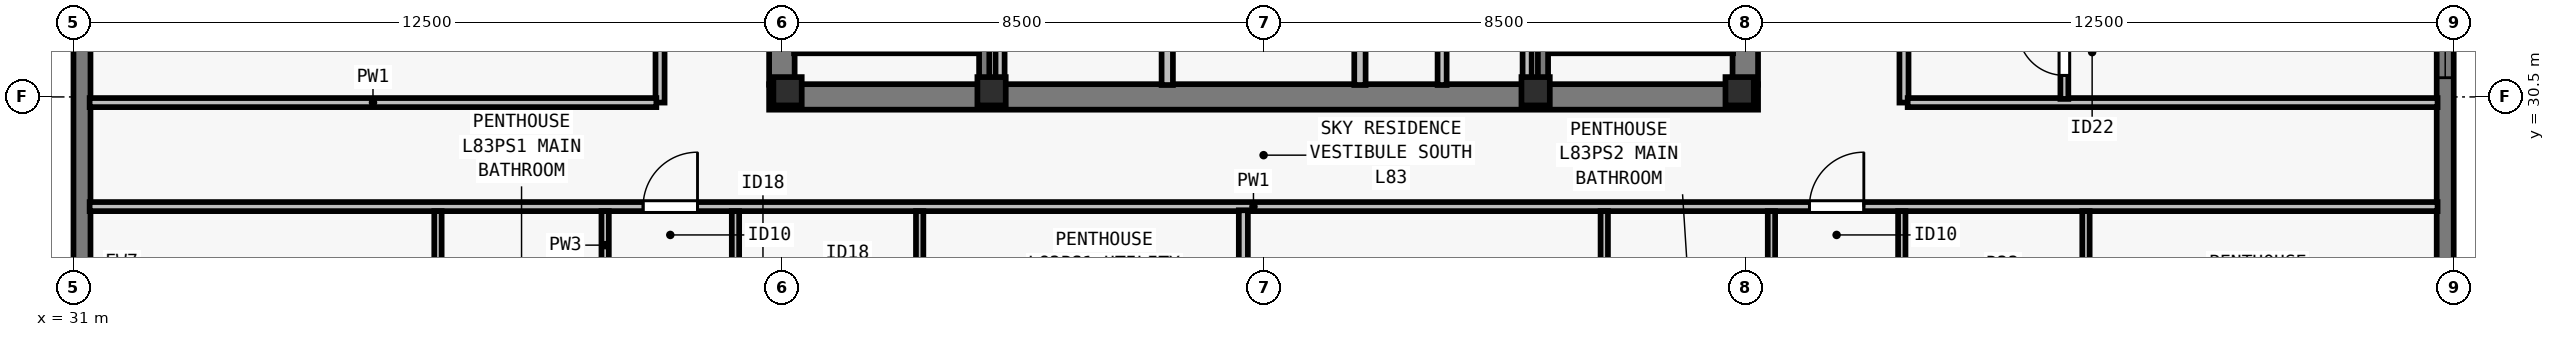
"""IFC4 building model, lengths in metres.
Left out: names, types, materials, properties, quantities, classifications, styles, units other than length and angle.
Written with IfcOpenShell. Run it as: python <this file> out.ifc"""

import sys

from ifc_helpers import new_model, si_unit, direction, frame, frame_2d, origin, origin_2d, place, context, subcontext, project, spatial, rectangle, i_section, extrude, element, fill, save


model = new_model("IFC4")
c1 = context("Model", 3, precision=1e-05, world=origin(), true_north=direction((0.0, 1.0)))
c2 = subcontext(c1, "Body", "Model", "MODEL_VIEW")
j1 = project(units=[si_unit("LENGTHUNIT", "METRE"), si_unit("PLANEANGLEUNIT", "RADIAN")], contexts=[c1])
p1 = place(None, origin())
s1 = spatial("IfcSite", under=j1, at=p1, CompositionType="ELEMENT")
p2 = place(p1, origin())
s2 = spatial("IfcBuilding", under=s1, at=p2, CompositionType="ELEMENT")
p3 = place(p2, frame((0.0, 0.0, 301.5)))
s3 = spatial("IfcBuildingStorey", under=s2, at=p3, CompositionType="ELEMENT", Elevation=301.5)
for number, where, z_axis, x_axis in (
    (1, (43.6, 30.6, 0.0), (0.0, 0.0, 1.0), (1.0, 0.0, 0.0)),
    (2, (47.2, 30.6, 0.0), (0.0, 0.0, 1.0), (1.0, 0.0, 0.0)),
    (3, (56.8, 30.6, 0.0), (0.0, 0.0, 1.0), (1.0, 0.0, 0.0)),
    (4, (60.4, 30.6, 0.0), (0.0, 0.0, 1.0), (1.0, 0.0, 0.0)),
):
    element("IfcColumn", number, at=place(p3, frame(where, z_axis=z_axis, x_axis=x_axis)), inside=s3, PredefinedType="COLUMN", context=c2, shape_type="SweptSolid", body=[
        extrude(i_section(OverallWidth=0.5, OverallDepth=0.5, WebThickness=0.028, FlangeThickness=0.045, at=origin_2d()), origin(), (0.0, 0.0, 1.0), 3.5),
    ])
p4 = place(p3, frame((72.85, 34.8, 0.0), z_axis=(0.0, 0.0, 1.0), x_axis=(0.0, -1.0, 0.0)))
e5 = element("IfcWall", 5, at=p4, inside=s3, PredefinedType="SOLIDWALL", context=c2, shape_type="SweptSolid", body=[
    extrude(rectangle(XDim=11.022, YDim=0.3, at=frame_2d((5.511, 0.0))), origin(), (0.0, 0.0, 1.0), 3.29),
])
p5 = place(p4, frame((1.961, 0.0, 0.8)))
e6 = element("IfcOpeningElement", 6, at=p5, cuts=e5, PredefinedType="OPENING", context=c2, shape_type="SweptSolid", body=[
    extrude(rectangle(XDim=2.0, YDim=1.758, at=frame_2d((1.0, 0.879))), frame((0.0, 0.16, 0.0), z_axis=(0.0, -1.0, 0.0), x_axis=(1.0, 0.0, 0.0)), (0.0, 0.0, 1.0), 0.32),
])
p6 = place(p3, frame((31.15, 23.5, 0.0), z_axis=(0.0, 0.0, 1.0), x_axis=(0.0, 1.0, 0.0)))
e7 = element("IfcWall", 7, at=p6, inside=s3, PredefinedType="SOLIDWALL", context=c2, shape_type="SweptSolid", body=[
    extrude(rectangle(XDim=30.722, YDim=0.3, at=frame_2d((15.361, 0.0))), origin(), (0.0, 0.0, 1.0), 3.29),
])
p7 = place(p6, frame((8.331, 0.0, 0.8)))
e8 = element("IfcOpeningElement", 8, at=p7, cuts=e7, PredefinedType="OPENING", context=c2, shape_type="SweptSolid", body=[
    extrude(rectangle(XDim=1.65, YDim=1.758, at=frame_2d((0.825, 0.879))), frame((0.0, 0.16, 0.0), z_axis=(0.0, -1.0, 0.0), x_axis=(1.0, 0.0, 0.0)), (0.0, 0.0, 1.0), 0.32),
])
p8 = place(p6, frame((12.442, 0.0, 0.8)))
e9 = element("IfcOpeningElement", 9, at=p8, cuts=e7, PredefinedType="OPENING", context=c2, shape_type="SweptSolid", body=[
    extrude(rectangle(XDim=2.0, YDim=1.758, at=frame_2d((1.0, 0.879))), frame((0.0, 0.16, 0.0), z_axis=(0.0, -1.0, 0.0), x_axis=(1.0, 0.0, 0.0)), (0.0, 0.0, 1.0), 0.32),
])
p9 = place(p6, frame((16.455, 0.0, 0.8)))
e10 = element("IfcOpeningElement", 10, at=p9, cuts=e7, PredefinedType="OPENING", context=c2, shape_type="SweptSolid", body=[
    extrude(rectangle(XDim=1.65, YDim=1.758, at=frame_2d((0.825, 0.879))), frame((0.0, 0.16, 0.0), z_axis=(0.0, -1.0, 0.0), x_axis=(1.0, 0.0, 0.0)), (0.0, 0.0, 1.0), 0.32),
])
p10 = place(p6, frame((20.967, 0.0, 0.8)))
e11 = element("IfcOpeningElement", 11, at=p10, cuts=e7, PredefinedType="OPENING", context=c2, shape_type="SweptSolid", body=[
    extrude(rectangle(XDim=2.0, YDim=1.758, at=frame_2d((1.0, 0.879))), frame((0.0, 0.16, 0.0), z_axis=(0.0, -1.0, 0.0), x_axis=(1.0, 0.0, 0.0)), (0.0, 0.0, 1.0), 0.32),
])
p11 = place(p3, frame((43.275, 30.5, 0.0), z_axis=(0.0, 0.0, 1.0), x_axis=(1.0, 0.0, 0.0)))
e12 = element("IfcWall", 12, at=p11, inside=s3, PredefinedType="SHEAR", context=c2, shape_type="SweptSolid", body=[
    extrude(rectangle(XDim=17.45, YDim=0.45, at=frame_2d((8.725, 0.0))), origin(), (0.0, 0.0, 1.0), 3.29),
])
for number, where, z_axis, x_axis in (
    (13, (43.5, 30.715, 0.0), (0.0, 0.0, 1.0), (0.0, 1.0, 0.0)),
    (14, (60.5, 30.715, 0.0), (0.0, 0.0, 1.0), (0.0, 1.0, 0.0)),
):
    element("IfcWall", number, at=place(p3, frame(where, z_axis=z_axis, x_axis=x_axis)), inside=s3, PredefinedType="SHEAR", context=c2, shape_type="SweptSolid", body=[
        extrude(rectangle(XDim=8.035, YDim=0.45, at=frame_2d((4.018, 0.0))), origin(), (0.0, 0.0, 1.0), 3.29),
    ])
p12 = place(p3, frame((50.3, 30.71, 0.0), z_axis=(0.0, 0.0, 1.0), x_axis=(0.0, 1.0, 0.0)))
e15 = element("IfcWall", 15, at=p12, inside=s3, PredefinedType="SOLIDWALL", context=c2, shape_type="SweptSolid", body=[
    extrude(rectangle(XDim=7.905, YDim=0.2, at=frame_2d((3.953, 0.0))), origin(), (0.0, 0.0, 1.0), 3.29),
])
p13 = place(p12, frame((1.39, 0.0, 0.0)))
e16 = element("IfcOpeningElement", 16, at=p13, cuts=e15, PredefinedType="OPENING", context=c2, shape_type="SweptSolid", body=[
    extrude(rectangle(XDim=0.9, YDim=2.12, at=frame_2d((0.45, 1.06))), frame((0.0, 0.11, 0.0), z_axis=(0.0, -1.0, 0.0), x_axis=(1.0, 0.0, 0.0)), (0.0, 0.0, 1.0), 0.22),
])
p14 = place(p12, frame((5.39, 0.0, 0.0)))
e17 = element("IfcOpeningElement", 17, at=p14, cuts=e15, PredefinedType="OPENING", context=c2, shape_type="SweptSolid", body=[
    extrude(rectangle(XDim=0.9, YDim=2.12, at=frame_2d((0.45, 1.06))), frame((0.0, 0.11, 0.0), z_axis=(0.0, -1.0, 0.0), x_axis=(1.0, 0.0, 0.0)), (0.0, 0.0, 1.0), 0.22),
])
p15 = place(p3, frame((53.7, 30.71, 0.0), z_axis=(0.0, 0.0, 1.0), x_axis=(0.0, 1.0, 0.0)))
e18 = element("IfcWall", 18, at=p15, inside=s3, PredefinedType="SOLIDWALL", context=c2, shape_type="SweptSolid", body=[
    extrude(rectangle(XDim=7.905, YDim=0.2, at=frame_2d((3.953, 0.0))), origin(), (0.0, 0.0, 1.0), 3.29),
])
p16 = place(p15, frame((2.14, 0.0, 0.0)))
e19 = element("IfcOpeningElement", 19, at=p16, cuts=e18, PredefinedType="OPENING", context=c2, shape_type="SweptSolid", body=[
    extrude(rectangle(XDim=0.95, YDim=2.12, at=frame_2d((0.475, 1.06))), frame((0.0, 0.11, 0.0), z_axis=(0.0, -1.0, 0.0), x_axis=(1.0, 0.0, 0.0)), (0.0, 0.0, 1.0), 0.22),
])
for number, where, z_axis, x_axis in (
    (20, (47.35, 30.71, 0.0), (0.0, 0.0, 1.0), (0.0, 1.0, 0.0)),
    (21, (56.65, 30.71, 0.0), (0.0, 0.0, 1.0), (0.0, 1.0, 0.0)),
):
    element("IfcWall", number, at=place(p3, frame(where, z_axis=z_axis, x_axis=x_axis)), inside=s3, PredefinedType="PARTITIONING", context=c2, shape_type="SweptSolid", body=[
        extrude(rectangle(XDim=7.905, YDim=0.16, at=frame_2d((3.953, 0.0))), origin(), (0.0, 0.0, 1.0), 3.29),
    ])
p17 = place(p3, frame((55.15, 30.71, 0.0), z_axis=(0.0, 0.0, 1.0), x_axis=(0.0, 1.0, 0.0)))
e22 = element("IfcWall", 22, at=p17, inside=s3, PredefinedType="PARTITIONING", context=c2, shape_type="SweptSolid", body=[
    extrude(rectangle(XDim=7.905, YDim=0.16, at=frame_2d((3.953, 0.0))), origin(), (0.0, 0.0, 1.0), 3.29),
])
p18 = place(p17, frame((3.54, 0.0, 0.0)))
e23 = element("IfcOpeningElement", 23, at=p18, cuts=e22, PredefinedType="OPENING", context=c2, shape_type="SweptSolid", body=[
    extrude(rectangle(XDim=0.85, YDim=2.12, at=frame_2d((0.425, 1.06))), frame((0.0, 0.09, 0.0), z_axis=(0.0, -1.0, 0.0), x_axis=(1.0, 0.0, 0.0)), (0.0, 0.0, 1.0), 0.18),
])
p19 = place(p3, frame((31.285, 28.565, 0.0), z_axis=(0.0, 0.0, 1.0), x_axis=(1.0, 0.0, 0.0)))
e24 = element("IfcWall", 24, at=p19, inside=s3, PredefinedType="PARTITIONING", context=c2, shape_type="SweptSolid", body=[
    extrude(rectangle(XDim=41.43, YDim=0.16, at=frame_2d((20.715, 0.0))), origin(), (0.0, 0.0, 1.0), 3.009),
])
p20 = place(p19, frame((9.766, 0.0, 0.0)))
e25 = element("IfcOpeningElement", 25, at=p20, cuts=e24, PredefinedType="OPENING", context=c2, shape_type="SweptSolid", body=[
    extrude(rectangle(XDim=0.96, YDim=2.18, at=frame_2d((0.48, 1.09))), frame((0.0, 0.09, 0.0), z_axis=(0.0, -1.0, 0.0), x_axis=(1.0, 0.0, 0.0)), (0.0, 0.0, 1.0), 0.18),
])
p21 = place(p19, frame((30.346, 0.0, 0.0)))
e26 = element("IfcOpeningElement", 26, at=p21, cuts=e24, PredefinedType="OPENING", context=c2, shape_type="SweptSolid", body=[
    extrude(rectangle(XDim=0.96, YDim=2.18, at=frame_2d((0.48, 1.09))), frame((0.0, 0.09, 0.0), z_axis=(0.0, -1.0, 0.0), x_axis=(1.0, 0.0, 0.0)), (0.0, 0.0, 1.0), 0.18),
])
p22 = place(p3, frame((41.35, 30.4, 0.0), z_axis=(0.0, 0.0, 1.0), x_axis=(0.0, 1.0, 0.0)))
e27 = element("IfcWall", 27, at=p22, inside=s3, PredefinedType="PARTITIONING", context=c2, shape_type="SweptSolid", body=[
    extrude(rectangle(XDim=17.2, YDim=0.16, at=frame_2d((8.6, 0.0))), origin(), (0.0, 0.0, 1.0), 3.009),
])
p23 = place(p22, frame((8.0, 0.0, 0.0)))
e28 = element("IfcOpeningElement", 28, at=p23, cuts=e27, PredefinedType="OPENING", context=c2, shape_type="SweptSolid", body=[
    extrude(rectangle(XDim=0.96, YDim=2.12, at=frame_2d((0.48, 1.06))), frame((0.0, 0.09, 0.0), z_axis=(0.0, -1.0, 0.0), x_axis=(1.0, 0.0, 0.0)), (0.0, 0.0, 1.0), 0.18),
])
p24 = place(p3, frame((63.3, 30.4, 0.0), z_axis=(0.0, 0.0, 1.0), x_axis=(0.0, 1.0, 0.0)))
e29 = element("IfcWall", 29, at=p24, inside=s3, PredefinedType="PARTITIONING", context=c2, shape_type="SweptSolid", body=[
    extrude(rectangle(XDim=17.2, YDim=0.16, at=frame_2d((8.6, 0.0))), origin(), (0.0, 0.0, 1.0), 3.29),
])
p25 = place(p24, frame((8.12, 0.0, 0.0)))
e30 = element("IfcOpeningElement", 30, at=p25, cuts=e29, PredefinedType="OPENING", context=c2, shape_type="SweptSolid", body=[
    extrude(rectangle(XDim=0.96, YDim=2.18, at=frame_2d((0.48, 1.09))), frame((0.0, 0.09, 0.0), z_axis=(0.0, -1.0, 0.0), x_axis=(1.0, 0.0, 0.0)), (0.0, 0.0, 1.0), 0.18),
])
p26 = place(p3, frame((31.285, 30.4, 0.0), z_axis=(0.0, 0.0, 1.0), x_axis=(1.0, 0.0, 0.0)))
e31 = element("IfcWall", 31, at=p26, inside=s3, PredefinedType="PARTITIONING", context=c2, shape_type="SweptSolid", body=[
    extrude(rectangle(XDim=10.0, YDim=0.16, at=frame_2d((5.0, 0.0))), origin(), (0.0, 0.0, 1.0), 3.29),
])
p27 = place(p3, frame((63.365, 30.4, 0.0), z_axis=(0.0, 0.0, 1.0), x_axis=(1.0, 0.0, 0.0)))
e32 = element("IfcWall", 32, at=p27, inside=s3, PredefinedType="PARTITIONING", context=c2, shape_type="SweptSolid", body=[
    extrude(rectangle(XDim=9.35, YDim=0.16, at=frame_2d((4.675, 0.0))), origin(), (0.0, 0.0, 1.0), 3.29),
])
p28 = place(p3, frame((37.431, 25.735, 0.0), z_axis=(0.0, 0.0, 1.0), x_axis=(0.0, 1.0, 0.0)))
e33 = element("IfcWall", 33, at=p28, inside=s3, PredefinedType="PLUMBINGWALL", context=c2, shape_type="SweptSolid", body=[
    extrude(rectangle(XDim=2.75, YDim=0.13, at=frame_2d((1.375, 0.0))), origin(), (0.0, 0.0, 1.0), 3.29),
])
p29 = place(p3, frame((40.381, 25.735, 0.0), z_axis=(0.0, 0.0, 1.0), x_axis=(0.0, 1.0, 0.0)))
e34 = element("IfcWall", 34, at=p29, inside=s3, PredefinedType="PLUMBINGWALL", context=c2, shape_type="SweptSolid", body=[
    extrude(rectangle(XDim=2.75, YDim=0.13, at=frame_2d((1.375, 0.0))), origin(), (0.0, 0.0, 1.0), 3.29),
])
p30 = place(p29, frame((0.55, 0.0, 0.0)))
e35 = element("IfcOpeningElement", 35, at=p30, cuts=e34, PredefinedType="OPENING", context=c2, shape_type="SweptSolid", body=[
    extrude(rectangle(XDim=0.85, YDim=2.08, at=frame_2d((0.425, 1.04))), frame((0.0, 0.075, 0.0), z_axis=(0.0, -1.0, 0.0), x_axis=(1.0, 0.0, 0.0)), (0.0, 0.0, 1.0), 0.15),
])
p31 = place(p3, frame((45.931, 25.735, 0.0), z_axis=(0.0, 0.0, 1.0), x_axis=(0.0, 1.0, 0.0)))
e36 = element("IfcWall", 36, at=p31, inside=s3, PredefinedType="PLUMBINGWALL", context=c2, shape_type="SweptSolid", body=[
    extrude(rectangle(XDim=2.75, YDim=0.13, at=frame_2d((1.375, 0.0))), origin(), (0.0, 0.0, 1.0), 3.29),
])
p32 = place(p3, frame((42.681, 25.735, 0.0), z_axis=(0.0, 0.0, 1.0), x_axis=(0.0, 1.0, 0.0)))
e37 = element("IfcWall", 37, at=p32, inside=s3, PredefinedType="PLUMBINGWALL", context=c2, shape_type="SweptSolid", body=[
    extrude(rectangle(XDim=2.75, YDim=0.13, at=frame_2d((1.375, 0.0))), origin(), (0.0, 0.0, 1.0), 3.29),
])
p33 = place(p32, frame((0.55, 0.0, 0.0)))
e38 = element("IfcOpeningElement", 38, at=p33, cuts=e37, PredefinedType="OPENING", context=c2, shape_type="SweptSolid", body=[
    extrude(rectangle(XDim=0.88, YDim=2.1, at=frame_2d((0.44, 1.05))), frame((0.0, 0.075, 0.0), z_axis=(0.0, -1.0, 0.0), x_axis=(1.0, 0.0, 0.0)), (0.0, 0.0, 1.0), 0.15),
])
p34 = place(p3, frame((51.643, 18.285, 0.0), z_axis=(0.0, 0.0, 1.0), x_axis=(0.0, 1.0, 0.0)))
e39 = element("IfcWall", 39, at=p34, inside=s3, PredefinedType="PARTITIONING", context=c2, shape_type="SweptSolid", body=[
    extrude(rectangle(XDim=10.215, YDim=0.16, at=frame_2d((5.107, 0.0))), origin(), (0.0, 0.0, 1.0), 3.009),
])
p35 = place(p3, frame((58.011, 25.735, 0.0), z_axis=(0.0, 0.0, 1.0), x_axis=(0.0, 1.0, 0.0)))
e40 = element("IfcWall", 40, at=p35, inside=s3, PredefinedType="PLUMBINGWALL", context=c2, shape_type="SweptSolid", body=[
    extrude(rectangle(XDim=2.75, YDim=0.13, at=frame_2d((1.375, 0.0))), origin(), (0.0, 0.0, 1.0), 3.29),
])
p36 = place(p3, frame((60.961, 25.735, 0.0), z_axis=(0.0, 0.0, 1.0), x_axis=(0.0, 1.0, 0.0)))
e41 = element("IfcWall", 41, at=p36, inside=s3, PredefinedType="PLUMBINGWALL", context=c2, shape_type="SweptSolid", body=[
    extrude(rectangle(XDim=2.75, YDim=0.13, at=frame_2d((1.375, 0.0))), origin(), (0.0, 0.0, 1.0), 3.29),
])
p37 = place(p36, frame((0.55, 0.0, 0.0)))
e42 = element("IfcOpeningElement", 42, at=p37, cuts=e41, PredefinedType="OPENING", context=c2, shape_type="SweptSolid", body=[
    extrude(rectangle(XDim=0.85, YDim=2.08, at=frame_2d((0.425, 1.04))), frame((0.0, 0.075, 0.0), z_axis=(0.0, -1.0, 0.0), x_axis=(1.0, 0.0, 0.0)), (0.0, 0.0, 1.0), 0.15),
])
p38 = place(p3, frame((66.511, 25.735, 0.0), z_axis=(0.0, 0.0, 1.0), x_axis=(0.0, 1.0, 0.0)))
e43 = element("IfcWall", 43, at=p38, inside=s3, PredefinedType="PLUMBINGWALL", context=c2, shape_type="SweptSolid", body=[
    extrude(rectangle(XDim=2.75, YDim=0.13, at=frame_2d((1.375, 0.0))), origin(), (0.0, 0.0, 1.0), 3.29),
])
p39 = place(p3, frame((63.261, 25.735, 0.0), z_axis=(0.0, 0.0, 1.0), x_axis=(0.0, 1.0, 0.0)))
e44 = element("IfcWall", 44, at=p39, inside=s3, PredefinedType="PLUMBINGWALL", context=c2, shape_type="SweptSolid", body=[
    extrude(rectangle(XDim=2.75, YDim=0.13, at=frame_2d((1.375, 0.0))), origin(), (0.0, 0.0, 1.0), 3.29),
])
p40 = place(p39, frame((0.55, 0.0, 0.0)))
e45 = element("IfcOpeningElement", 45, at=p40, cuts=e44, PredefinedType="OPENING", context=c2, shape_type="SweptSolid", body=[
    extrude(rectangle(XDim=0.88, YDim=2.1, at=frame_2d((0.44, 1.05))), frame((0.0, 0.075, 0.0), z_axis=(0.0, -1.0, 0.0), x_axis=(1.0, 0.0, 0.0)), (0.0, 0.0, 1.0), 0.15),
])
p41 = place(p3, frame((66.13, 30.465, 0.0), z_axis=(0.0, 0.0, 1.0), x_axis=(0.0, 1.0, 0.0)))
e46 = element("IfcWall", 46, at=p41, inside=s3, PredefinedType="PARTITIONING", context=c2, shape_type="SweptSolid", body=[
    extrude(rectangle(XDim=4.16, YDim=0.14, at=frame_2d((2.08, 0.0))), origin(), (0.0, 0.0, 1.0), 3.29),
])
p42 = place(p41, frame((0.415, 0.0, 0.0)))
e47 = element("IfcOpeningElement", 47, at=p42, cuts=e46, PredefinedType="OPENING", context=c2, shape_type="SweptSolid", body=[
    extrude(rectangle(XDim=0.82, YDim=2.1, at=frame_2d((0.41, 1.05))), frame((0.0, 0.08, 0.0), z_axis=(0.0, -1.0, 0.0), x_axis=(1.0, 0.0, 0.0)), (0.0, 0.0, 1.0), 0.16),
])
p43 = place(p3, frame((43.715, 31.36, 0.0), z_axis=(0.0, 0.0, 1.0), x_axis=(1.0, 0.0, 0.0)))
e48 = element("IfcWall", 48, at=p43, inside=s3, PredefinedType="SOLIDWALL", context=c2, shape_type="SweptSolid", body=[
    extrude(rectangle(XDim=3.28, YDim=0.18, at=frame_2d((1.64, 0.0))), origin(), (0.0, 0.0, 1.0), 3.29),
])
p44 = place(p3, frame((47.07, 38.78, 0.0), z_axis=(0.0, 0.0, 1.0), x_axis=(0.0, -1.0, 0.0)))
e49 = element("IfcWall", 49, at=p44, inside=s3, PredefinedType="SOLIDWALL", context=c2, shape_type="SweptSolid", body=[
    extrude(rectangle(XDim=8.067, YDim=0.18, at=frame_2d((4.034, 0.0))), origin(), (0.0, 0.0, 1.0), 3.29),
])
p45 = place(p3, frame((57.005, 31.36, 0.0), z_axis=(0.0, 0.0, 1.0), x_axis=(1.0, 0.0, 0.0)))
e50 = element("IfcWall", 50, at=p45, inside=s3, PredefinedType="SOLIDWALL", context=c2, shape_type="SweptSolid", body=[
    extrude(rectangle(XDim=3.28, YDim=0.18, at=frame_2d((1.64, 0.0))), origin(), (0.0, 0.0, 1.0), 3.29),
])
p46 = place(p3, frame((56.93, 38.78, 0.0), z_axis=(0.0, 0.0, 1.0), x_axis=(0.0, -1.0, 0.0)))
e51 = element("IfcWall", 51, at=p46, inside=s3, PredefinedType="SOLIDWALL", context=c2, shape_type="SweptSolid", body=[
    extrude(rectangle(XDim=8.067, YDim=0.18, at=frame_2d((4.034, 0.0))), origin(), (0.0, 0.0, 1.0), 3.29),
])
p47 = place(p5, origin())
e52 = element("IfcWindow", 52, at=p47, inside=s3, PartitioningType="SINGLE_PANEL", PredefinedType="WINDOW", context=c2, shape_type="SweptSolid", body=[
    extrude(rectangle(XDim=2.0, YDim=1.758, at=frame_2d((1.0, 0.879))), frame((0.0, -0.05, 0.0), z_axis=(0.0, -1.0, 0.0), x_axis=(1.0, 0.0, 0.0)), (0.0, 0.0, 1.0), 0.06),
])
fill(e6, e52)
p48 = place(p20, origin())
e53 = element("IfcDoor", 53, at=p48, inside=s3, OperationType="SINGLE_SWING_RIGHT", PredefinedType="DOOR", context=c2, shape_type="SweptSolid", body=[
    extrude(rectangle(XDim=0.96, YDim=2.18, at=frame_2d((0.48, 1.09))), frame((0.0, 0.025, 0.0), z_axis=(0.0, -1.0, 0.0), x_axis=(1.0, 0.0, 0.0)), (0.0, 0.0, 1.0), 0.05),
])
fill(e25, e53)
p49 = place(p21, origin())
e54 = element("IfcDoor", 54, at=p49, inside=s3, OperationType="SINGLE_SWING_RIGHT", PredefinedType="DOOR", context=c2, shape_type="SweptSolid", body=[
    extrude(rectangle(XDim=0.96, YDim=2.18, at=frame_2d((0.48, 1.09))), frame((0.0, 0.025, 0.0), z_axis=(0.0, -1.0, 0.0), x_axis=(1.0, 0.0, 0.0)), (0.0, 0.0, 1.0), 0.05),
])
fill(e26, e54)
p50 = place(p42, origin())
e55 = element("IfcDoor", 55, at=p50, inside=s3, OperationType="SINGLE_SWING_RIGHT", PredefinedType="DOOR", context=c2, shape_type="SweptSolid", body=[
    extrude(rectangle(XDim=0.82, YDim=2.1, at=frame_2d((0.41, 1.05))), frame((0.0, 0.025, 0.0), z_axis=(0.0, -1.0, 0.0), x_axis=(1.0, 0.0, 0.0)), (0.0, 0.0, 1.0), 0.05),
])
fill(e47, e55)
save(model, sys.argv[1])
